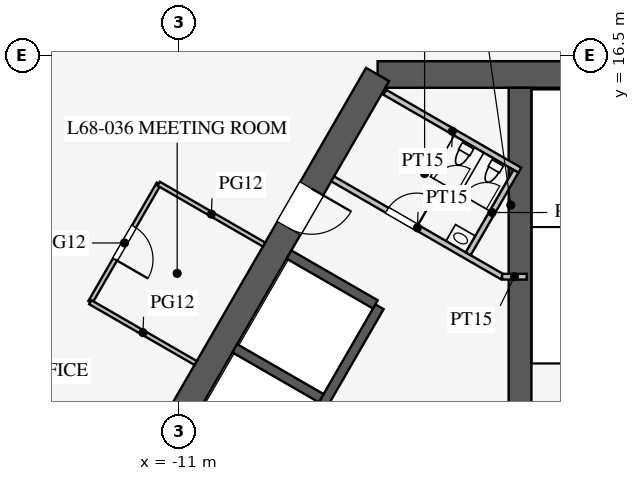
"""IFC4 building model, lengths in metres.
Left out: names, types, materials, properties, quantities, classifications, styles, units other than length and angle.
Written with IfcOpenShell. Run it as: python <this file> out.ifc"""

import sys

from ifc_helpers import new_model, si_unit, direction, frame, frame_2d, origin, place, context, subcontext, project, spatial, rectangle, extrude, element, fill, save


model = new_model("IFC4")
c1 = context("Model", 3, precision=1e-05, world=origin(), true_north=direction((0.0, 1.0)))
c2 = subcontext(c1, "Body", "Model", "MODEL_VIEW")
j1 = project(units=[si_unit("LENGTHUNIT", "METRE"), si_unit("PLANEANGLEUNIT", "RADIAN")], contexts=[c1])
p1 = place(None, origin())
s1 = spatial("IfcSite", under=j1, at=p1, CompositionType="ELEMENT")
p2 = place(p1, origin())
s2 = spatial("IfcBuilding", under=s1, at=p2, CompositionType="ELEMENT")
p3 = place(p2, frame((0.0, 0.0, 297.3)))
s3 = spatial("IfcBuildingStorey", under=s2, at=p3, CompositionType="ELEMENT", Elevation=297.3)
p4 = place(p3, frame((5.773, 16.0, 0.0), z_axis=(0.0, 0.0, 1.0), x_axis=(-1.0, 0.0, 0.0)))
e1 = element("IfcWall", 1, at=p4, inside=s3, PredefinedType="SHEAR", context=c2, shape_type="SweptSolid", body=[
    extrude(rectangle(XDim=11.547, YDim=0.7, at=frame_2d((5.773, 0.0))), origin(), (0.0, 0.0, 1.0), 4.2),
])
p5 = place(p3, frame((-5.773, 16.0, 0.0), z_axis=(0.0, 0.0, 1.0), x_axis=(-0.500002442456, -0.866023993627, 0.0)))
e2 = element("IfcWall", 2, at=p5, inside=s3, PredefinedType="SHEAR", context=c2, shape_type="SweptSolid", body=[
    extrude(rectangle(XDim=21.939, YDim=0.7, at=frame_2d((10.97, 0.0))), origin(), (0.0, 0.0, 1.0), 4.2),
])
p6 = place(p5, frame((17.27, 0.0, 0.0)))
e3 = element("IfcOpeningElement", 3, at=p6, cuts=e2, PredefinedType="OPENING", context=c2, shape_type="SweptSolid", body=[
    extrude(rectangle(XDim=1.2, YDim=2.1, at=frame_2d((0.6, 1.05))), frame((0.0, 0.36, 0.0), z_axis=(0.0, -1.0, 0.0), x_axis=(1.0, 0.0, 0.0)), (0.0, 0.0, 1.0), 0.72),
])
p7 = place(p5, frame((3.47, 0.0, 0.0)))
e4 = element("IfcOpeningElement", 4, at=p7, cuts=e2, PredefinedType="OPENING", context=c2, shape_type="SweptSolid", body=[
    extrude(rectangle(XDim=1.2, YDim=2.1, at=frame_2d((0.6, 1.05))), frame((0.0, 0.36, 0.0), z_axis=(0.0, -1.0, 0.0), x_axis=(1.0, 0.0, 0.0)), (0.0, 0.0, 1.0), 0.72),
])
p8 = place(p3, frame((-5.724, 9.886, 0.0), z_axis=(0.0, 0.0, 1.0), x_axis=(-0.500001763848, -0.866024385424, 0.0)))
e5 = element("IfcWall", 5, at=p8, inside=s3, PredefinedType="SHEAR", context=c2, shape_type="SweptSolid", body=[
    extrude(rectangle(XDim=11.4, YDim=0.25, at=frame_2d((5.7, 0.0))), origin(), (0.0, 0.0, 1.0), 4.2),
])
p9 = place(p8, frame((6.525, 0.0, 0.0)))
e6 = element("IfcOpeningElement", 6, at=p9, cuts=e5, PredefinedType="OPENING", context=c2, shape_type="SweptSolid", body=[
    extrude(rectangle(XDim=1.2, YDim=2.2, at=frame_2d((0.6, 1.1))), frame((0.0, 0.135, 0.0), z_axis=(0.0, -1.0, 0.0), x_axis=(1.0, 0.0, 0.0)), (0.0, 0.0, 1.0), 0.27),
])
p10 = place(p8, frame((9.375, 0.0, 0.0)))
e7 = element("IfcOpeningElement", 7, at=p10, cuts=e5, PredefinedType="OPENING", context=c2, shape_type="SweptSolid", body=[
    extrude(rectangle(XDim=1.2, YDim=2.2, at=frame_2d((0.6, 1.1))), frame((0.0, 0.135, 0.0), z_axis=(0.0, -1.0, 0.0), x_axis=(1.0, 0.0, 0.0)), (0.0, 0.0, 1.0), 0.27),
])
for number, where, z_axis, x_axis in (
    (8, (-5.832, 9.949, 0.0), (0.0, 0.0, 1.0), (-0.866, 0.5, 0.0)),
    (9, (-7.257, 7.481, 0.0), (0.0, 0.0, 1.0), (-0.866, 0.5, 0.0)),
):
    element("IfcWall", number, at=place(p3, frame(where, z_axis=z_axis, x_axis=x_axis)), inside=s3, PredefinedType="SHEAR", context=c2, shape_type="SweptSolid", body=[
        extrude(rectangle(XDim=2.625, YDim=0.25, at=frame_2d((1.312, 0.0))), origin(), (0.0, 0.0, 1.0), 4.2),
    ])
p11 = place(p3, frame((-2.025, 6.525, 0.0), z_axis=(0.0, 0.0, 1.0), x_axis=(0.0, 1.0, 0.0)))
e10 = element("IfcWall", 10, at=p11, inside=s3, PredefinedType="SHEAR", context=c2, shape_type="SweptSolid", body=[
    extrude(rectangle(XDim=9.125, YDim=0.6, at=frame_2d((4.562, 0.0))), origin(), (0.0, 0.0, 1.0), 4.2),
])
p12 = place(p3, frame((-2.495, 10.678, 0.0), z_axis=(0.0, 0.0, 1.0), x_axis=(-0.866037967349, 0.499978238636, 0.0)))
e11 = element("IfcWall", 11, at=p12, inside=s3, PredefinedType="PARTITIONING", context=c2, shape_type="SweptSolid", body=[
    extrude(rectangle(XDim=5.15, YDim=0.15, at=frame_2d((2.575, 0.0))), origin(), (0.0, 0.0, 1.0), 4.0),
])
p13 = place(p12, frame((2.6, 0.0, 0.0)))
e12 = element("IfcOpeningElement", 12, at=p13, cuts=e11, PredefinedType="OPENING", context=c2, shape_type="SweptSolid", body=[
    extrude(rectangle(XDim=0.9, YDim=2.1, at=frame_2d((0.45, 1.05))), frame((0.0, 0.085, 0.0), z_axis=(0.0, -1.0, 0.0), x_axis=(1.0, 0.0, 0.0)), (0.0, 0.0, 1.0), 0.17),
])
p14 = place(p3, frame((-2.495, 10.678, 0.0), z_axis=(0.0, 0.0, 1.0), x_axis=(1.0, 0.0, 0.0)))
e13 = element("IfcWall", 13, at=p14, inside=s3, PredefinedType="PARTITIONING", context=c2, shape_type="SweptSolid", body=[
    extrude(rectangle(XDim=0.645, YDim=0.15, at=frame_2d((0.323, 0.0))), origin(), (0.0, 0.0, 1.0), 4.0),
])
p15 = place(p3, frame((-2.031, 13.482, 0.0), z_axis=(0.0, 0.0, 1.0), x_axis=(-0.866050731258, 0.499956128963, 0.0)))
e14 = element("IfcWall", 14, at=p15, inside=s3, PredefinedType="PARTITIONING", context=c2, shape_type="SweptSolid", body=[
    extrude(rectangle(XDim=4.1, YDim=0.15, at=frame_2d((2.05, 0.0))), origin(), (0.0, 0.0, 1.0), 4.0),
])
p16 = place(p3, frame((-3.389, 11.281, 0.0), z_axis=(0.0, 0.0, 1.0), x_axis=(0.499989096993, 0.866031698547, 0.0)))
e15 = element("IfcWall", 15, at=p16, inside=s3, PredefinedType="PARTITIONING", context=c2, shape_type="SweptSolid", body=[
    extrude(rectangle(XDim=2.51, YDim=0.15, at=frame_2d((1.255, 0.0))), origin(), (0.0, 0.0, 1.0), 4.0),
])
p17 = place(p3, frame((-11.533, 13.125, 0.0), z_axis=(0.0, 0.0, 1.0), x_axis=(-0.500012057535, -0.866018442252, 0.0)))
e16 = element("IfcWall", 16, at=p17, inside=s3, PredefinedType="PARTITIONING", context=c2, shape_type="SweptSolid", body=[
    extrude(rectangle(XDim=3.6, YDim=0.12, at=frame_2d((1.8, 0.0))), origin(), (0.0, 0.0, 1.0), 2.9),
])
p18 = place(p17, frame((1.3, 0.0, 0.15)))
e17 = element("IfcOpeningElement", 17, at=p18, cuts=e16, PredefinedType="OPENING", context=c2, shape_type="SweptSolid", body=[
    extrude(rectangle(XDim=1.0, YDim=2.1, at=frame_2d((0.5, 1.05))), frame((0.0, 0.07, 0.0), z_axis=(0.0, -1.0, 0.0), x_axis=(1.0, 0.0, 0.0)), (0.0, 0.0, 1.0), 0.14),
])
for number, where, z_axis, x_axis in (
    (18, (-10.562, 8.407, 0.0), (0.0, 0.0, 1.0), (-0.866, 0.5, 0.0)),
    (19, (-8.761, 11.525, 0.0), (0.0, 0.0, 1.0), (-0.866, 0.5, 0.0)),
):
    element("IfcWall", number, at=place(p3, frame(where, z_axis=z_axis, x_axis=x_axis)), inside=s3, PredefinedType="PARTITIONING", context=c2, shape_type="SweptSolid", body=[
        extrude(rectangle(XDim=3.2, YDim=0.12, at=frame_2d((1.6, 0.0))), origin(), (0.0, 0.0, 1.0), 2.9),
    ])
p19 = place(p13, frame((0.9, 0.0, 0.0), z_axis=(0.0, 0.0, 1.0), x_axis=(-1.0, 0.0, 0.0)))
e20 = element("IfcDoor", 20, at=p19, inside=s3, OperationType="SINGLE_SWING_RIGHT", PredefinedType="DOOR", context=c2, shape_type="SweptSolid", body=[
    extrude(rectangle(XDim=0.9, YDim=2.1, at=frame_2d((0.45, 1.05))), frame((0.0, 0.025, 0.0), z_axis=(0.0, -1.0, 0.0), x_axis=(1.0, 0.0, 0.0)), (0.0, 0.0, 1.0), 0.05),
])
fill(e12, e20)
p20 = place(p7, origin())
e21 = element("IfcDoor", 21, at=p20, inside=s3, OperationType="SINGLE_SWING_LEFT", PredefinedType="DOOR", context=c2, shape_type="SweptSolid", body=[
    extrude(rectangle(XDim=1.2, YDim=2.1, at=frame_2d((0.6, 1.05))), frame((0.0, 0.025, 0.0), z_axis=(0.0, -1.0, 0.0), x_axis=(1.0, 0.0, 0.0)), (0.0, 0.0, 1.0), 0.05),
])
fill(e4, e21)
p21 = place(p18, origin())
e22 = element("IfcDoor", 22, at=p21, inside=s3, OperationType="SINGLE_SWING_RIGHT", PredefinedType="DOOR", context=c2, shape_type="SweptSolid", body=[
    extrude(rectangle(XDim=1.0, YDim=2.1, at=frame_2d((0.5, 1.05))), frame((0.0, 0.025, 0.0), z_axis=(0.0, -1.0, 0.0), x_axis=(1.0, 0.0, 0.0)), (0.0, 0.0, 1.0), 0.05),
])
fill(e17, e22)
save(model, sys.argv[1])
